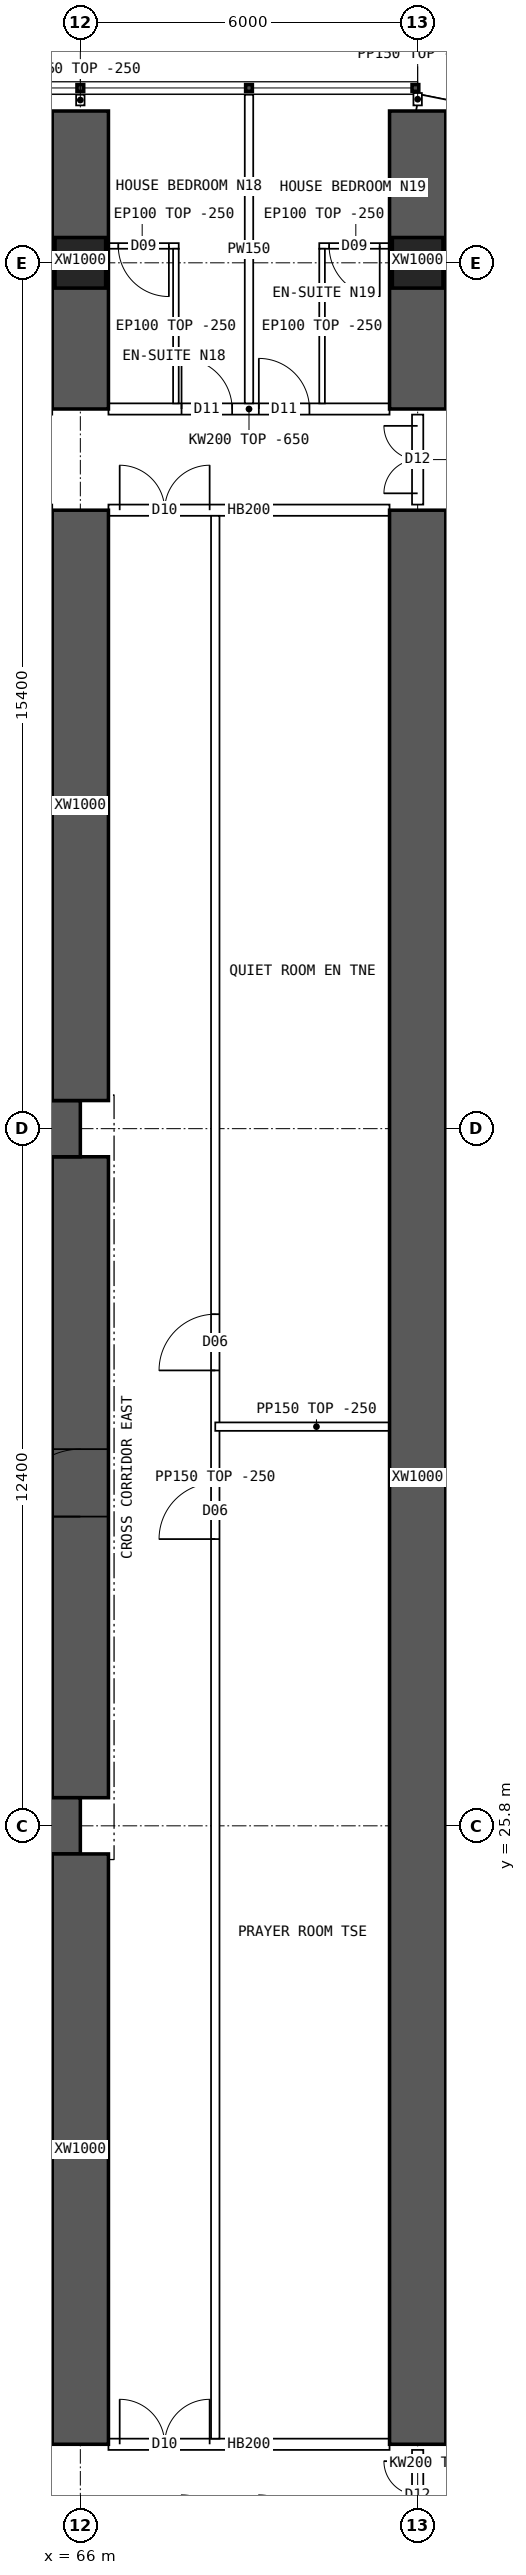
"""IFC4 building model, lengths in metres.
Left out: names, types, materials, properties, quantities, classifications, styles, units other than length and angle.
Written with IfcOpenShell. Run it as: python <this file> out.ifc"""

import sys

from ifc_helpers import new_model, si_unit, direction, frame, frame_2d, origin, origin_2d, place, context, subcontext, project, spatial, polyline, rectangle, hollow_rectangle, outline, extrude, element, fill, save


model = new_model("IFC4")
c1 = context("Model", 3, precision=1e-05, world=origin(), true_north=direction((0.0, 1.0)))
c2 = subcontext(c1, "Body", "Model", "MODEL_VIEW")
j1 = project(units=[si_unit("LENGTHUNIT", "METRE"), si_unit("PLANEANGLEUNIT", "RADIAN")], contexts=[c1])
p1 = place(None, origin())
s1 = spatial("IfcSite", under=j1, at=p1, CompositionType="ELEMENT")
p2 = place(p1, origin())
s2 = spatial("IfcBuilding", under=s1, at=p2, CompositionType="ELEMENT")
p3 = place(p2, frame((0.0, 0.0, 42.7)))
s3 = spatial("IfcBuildingStorey", under=s2, at=p3, CompositionType="ELEMENT", Elevation=42.7)
for number, where, z_axis, x_axis in (
    (1, (66.0, 53.6, 0.0), (0.0, 0.0, 1.0), (1.0, 0.0, 0.0)),
    (2, (72.0, 53.6, 0.0), (0.0, 0.0, 1.0), (1.0, 0.0, 0.0)),
):
    element("IfcColumn", number, at=place(p3, frame(where, z_axis=z_axis, x_axis=x_axis)), inside=s3, PredefinedType="COLUMN", context=c2, shape_type="SweptSolid", body=[
        extrude(hollow_rectangle(XDim=0.9, YDim=0.9, WallThickness=0.09, at=origin_2d()), origin(), (0.0, 0.0, 1.0), 3.75),
    ])
for number, where, z_axis, x_axis in (
    (3, (18.0, 25.8, 0.0), (0.0, 0.0, 1.0), (1.0, 0.0, 0.0)),
    (4, (18.0, 38.2, 0.0), (0.0, 0.0, 1.0), (1.0, 0.0, 0.0)),
):
    element("IfcWall", number, at=place(p3, frame(where, z_axis=z_axis, x_axis=x_axis)), inside=s3, PredefinedType="SHEAR", context=c2, shape_type="SweptSolid", body=[
        extrude(rectangle(XDim=48.0, YDim=1.0, at=frame_2d((24.0, 0.0))), origin(), (0.0, 0.0, 1.0), 3.75),
    ])
p4 = place(p3, frame((66.0, 26.3, 0.0), z_axis=(0.0, 0.0, 1.0), x_axis=(0.0, 1.0, 0.0)))
e5 = element("IfcWall", 5, at=p4, inside=s3, PredefinedType="SHEAR", context=c2, shape_type="SweptSolid", body=[
    extrude(rectangle(XDim=11.4, YDim=1.0, at=frame_2d((5.7, 0.0))), origin(), (0.0, 0.0, 1.0), 3.75),
])
p5 = place(p4, frame((5.0, 0.0, 0.0)))
e6 = element("IfcOpeningElement", 6, at=p5, cuts=e5, PredefinedType="OPENING", context=c2, shape_type="SweptSolid", body=[
    extrude(rectangle(XDim=1.2, YDim=2.1, at=frame_2d((0.6, 1.05))), frame((0.0, 0.51, 0.0), z_axis=(0.0, -1.0, 0.0), x_axis=(1.0, 0.0, 0.0)), (0.0, 0.0, 1.0), 1.02),
])
p6 = place(p3, frame((66.0, 51.0, 0.0), z_axis=(0.0, 0.0, 1.0), x_axis=(0.0, 1.0, 0.0)))
e7 = element("IfcWall", 7, at=p6, inside=s3, PredefinedType="SHEAR", context=c2, shape_type="SweptSolid", body=[
    extrude(rectangle(XDim=5.3, YDim=1.0, at=frame_2d((2.65, 0.0))), origin(), (0.0, 0.0, 1.0), 3.75),
])
for number, where, z_axis, x_axis in (
    (8, (66.0, 14.8, 0.0), (0.0, 0.0, 1.0), (0.0, 1.0, 0.0)),
    (9, (66.0, 38.7, 0.0), (0.0, 0.0, 1.0), (0.0, 1.0, 0.0)),
):
    element("IfcWall", number, at=place(p3, frame(where, z_axis=z_axis, x_axis=x_axis)), inside=s3, PredefinedType="SHEAR", context=c2, shape_type="SweptSolid", body=[
        extrude(rectangle(XDim=10.5, YDim=1.0, at=frame_2d((5.25, 0.0))), origin(), (0.0, 0.0, 1.0), 3.75),
    ])
p7 = place(p3, frame((72.0, 51.0, 0.0), z_axis=(0.0, 0.0, 1.0), x_axis=(0.0, 1.0, 0.0)))
e10 = element("IfcWall", 10, at=p7, inside=s3, PredefinedType="SHEAR", context=c2, shape_type="SweptSolid", body=[
    extrude(rectangle(XDim=5.3, YDim=1.0, at=frame_2d((2.65, 0.0))), origin(), (0.0, 0.0, 1.0), 3.75),
])
p8 = place(p3, frame((72.0, 14.8, 0.0), z_axis=(0.0, 0.0, 1.0), x_axis=(0.0, 1.0, 0.0)))
e11 = element("IfcWall", 11, at=p8, inside=s3, PredefinedType="SHEAR", context=c2, shape_type="SweptSolid", body=[
    extrude(rectangle(XDim=34.4, YDim=1.0, at=frame_2d((17.2, 0.0))), origin(), (0.0, 0.0, 1.0), 3.75),
])
p9 = place(p3, frame((75.157, 55.822, 0.0), z_axis=(0.0, 0.0, 1.0), x_axis=(-0.980787251524, 0.195080412259, 0.0)))
e12 = element("IfcWall", 12, at=p9, inside=s3, PredefinedType="SOLIDWALL", context=c2, shape_type="SweptSolid", body=[
    extrude(outline(polyline([(-0.03, -0.15), (3.249, -0.15), (3.189, 0.15), (0.03, 0.15), (-0.03, -0.15)])), origin(), (0.0, 0.0, 1.0), 3.5),
])
p10 = place(p9, frame((0.909, 0.0, 0.9)))
e13 = element("IfcOpeningElement", 13, at=p10, cuts=e12, PredefinedType="OPENING", context=c2, shape_type="SweptSolid", body=[
    extrude(rectangle(XDim=1.4, YDim=1.8, at=frame_2d((0.7, 0.9))), frame((0.0, 0.16, 0.0), z_axis=(0.0, -1.0, 0.0), x_axis=(1.0, 0.0, 0.0)), (0.0, 0.0, 1.0), 0.32),
])
p11 = place(p3, frame((66.5, 14.8, 0.0), z_axis=(0.0, 0.0, 1.0), x_axis=(1.0, 0.0, 0.0)))
e14 = element("IfcWall", 14, at=p11, inside=s3, PredefinedType="SOLIDWALL", context=c2, shape_type="SweptSolid", body=[
    extrude(rectangle(XDim=5.0, YDim=0.2, at=frame_2d((2.5, 0.0))), origin(), (0.0, 0.0, 1.0), 3.5),
])
p12 = place(p11, frame((0.2, 0.0, 0.0)))
e15 = element("IfcOpeningElement", 15, at=p12, cuts=e14, PredefinedType="OPENING", context=c2, shape_type="SweptSolid", body=[
    extrude(rectangle(XDim=1.6, YDim=2.1, at=frame_2d((0.8, 1.05))), frame((0.0, 0.11, 0.0), z_axis=(0.0, -1.0, 0.0), x_axis=(1.0, 0.0, 0.0)), (0.0, 0.0, 1.0), 0.22),
])
p13 = place(p3, frame((66.5, 51.0, 0.0), z_axis=(0.0, 0.0, 1.0), x_axis=(1.0, 0.0, 0.0)))
e16 = element("IfcWall", 16, at=p13, inside=s3, PredefinedType="SOLIDWALL", context=c2, shape_type="SweptSolid", body=[
    extrude(outline(polyline([(0.0, 0.0), (5.0, 0.0), (5.0, 3.1), (0.0, 3.1), (0.0, 0.0)])), frame((0.0, 0.1, 0.0), z_axis=(0.0, -1.0, 0.0), x_axis=(1.0, 0.0, 0.0)), (0.0, 0.0, 1.0), 0.2),
])
p14 = place(p13, frame((1.3, 0.0, 0.0)))
e17 = element("IfcOpeningElement", 17, at=p14, cuts=e16, PredefinedType="OPENING", context=c2, shape_type="SweptSolid", body=[
    extrude(rectangle(XDim=0.9, YDim=2.1, at=frame_2d((0.45, 1.05))), frame((0.0, 0.11, 0.0), z_axis=(0.0, -1.0, 0.0), x_axis=(1.0, 0.0, 0.0)), (0.0, 0.0, 1.0), 0.22),
])
p15 = place(p13, frame((2.675, 0.0, 0.0)))
e18 = element("IfcOpeningElement", 18, at=p15, cuts=e16, PredefinedType="OPENING", context=c2, shape_type="SweptSolid", body=[
    extrude(rectangle(XDim=0.9, YDim=2.1, at=frame_2d((0.45, 1.05))), frame((0.0, 0.11, 0.0), z_axis=(0.0, -1.0, 0.0), x_axis=(1.0, 0.0, 0.0)), (0.0, 0.0, 1.0), 0.22),
])
p16 = place(p3, frame((66.5, 49.2, 0.0), z_axis=(0.0, 0.0, 1.0), x_axis=(1.0, 0.0, 0.0)))
e19 = element("IfcWall", 19, at=p16, inside=s3, PredefinedType="SOLIDWALL", context=c2, shape_type="SweptSolid", body=[
    extrude(rectangle(XDim=5.0, YDim=0.2, at=frame_2d((2.5, 0.0))), origin(), (0.0, 0.0, 1.0), 3.5),
])
p17 = place(p16, frame((0.2, 0.0, 0.0)))
e20 = element("IfcOpeningElement", 20, at=p17, cuts=e19, PredefinedType="OPENING", context=c2, shape_type="SweptSolid", body=[
    extrude(rectangle(XDim=1.6, YDim=2.1, at=frame_2d((0.8, 1.05))), frame((0.0, 0.11, 0.0), z_axis=(0.0, -1.0, 0.0), x_axis=(1.0, 0.0, 0.0)), (0.0, 0.0, 1.0), 0.22),
])
p18 = place(p3, frame((69.0, 56.59, 0.0), z_axis=(0.0, 0.0, 1.0), x_axis=(0.0, -1.0, 0.0)))
e21 = element("IfcWall", 21, at=p18, inside=s3, PredefinedType="PARTITIONING", context=c2, shape_type="SweptSolid", body=[
    extrude(outline(polyline([(0.0, 0.0), (5.49, 0.0), (5.49, 3.1), (5.442, 3.1), (5.44, 3.5), (3.192, 3.5), (3.19, 3.1), (2.792, 3.1), (2.79, 3.5), (0.0, 3.5), (0.0, 0.0)])), frame((0.0, 0.075, 0.0), z_axis=(0.0, -1.0, 0.0), x_axis=(1.0, 0.0, 0.0)), (0.0, 0.0, 1.0), 0.15),
])
p19 = place(p3, frame((66.45, 53.9, 0.0), z_axis=(0.0, 0.0, 1.0), x_axis=(1.0, 0.0, 0.0)))
e22 = element("IfcWall", 22, at=p19, inside=s3, PredefinedType="PARTITIONING", context=c2, shape_type="SweptSolid", body=[
    extrude(rectangle(XDim=1.3, YDim=0.1, at=frame_2d((0.65, 0.0))), origin(), (0.0, 0.0, 1.0), 3.5),
])
p20 = place(p19, frame((0.225, 0.0, 0.0)))
e23 = element("IfcOpeningElement", 23, at=p20, cuts=e22, PredefinedType="OPENING", context=c2, shape_type="SweptSolid", body=[
    extrude(rectangle(XDim=0.9, YDim=2.1, at=frame_2d((0.45, 1.05))), frame((0.0, 0.06, 0.0), z_axis=(0.0, -1.0, 0.0), x_axis=(1.0, 0.0, 0.0)), (0.0, 0.0, 1.0), 0.12),
])
p21 = place(p3, frame((67.7, 53.85, 0.0), z_axis=(0.0, 0.0, 1.0), x_axis=(0.0, -1.0, 0.0)))
e24 = element("IfcWall", 24, at=p21, inside=s3, PredefinedType="PARTITIONING", context=c2, shape_type="SweptSolid", body=[
    extrude(outline(polyline([(0.0, 0.0), (2.75, 0.0), (2.75, 3.1), (2.702, 3.1), (2.7, 3.5), (0.452, 3.5), (0.45, 3.1), (0.0, 3.1), (0.0, 0.0)])), frame((0.0, 0.05, 0.0), z_axis=(0.0, -1.0, 0.0), x_axis=(1.0, 0.0, 0.0)), (0.0, 0.0, 1.0), 0.1),
])
p22 = place(p3, frame((70.25, 53.9, 0.0), z_axis=(0.0, 0.0, 1.0), x_axis=(1.0, 0.0, 0.0)))
e25 = element("IfcWall", 25, at=p22, inside=s3, PredefinedType="PARTITIONING", context=c2, shape_type="SweptSolid", body=[
    extrude(rectangle(XDim=1.3, YDim=0.1, at=frame_2d((0.65, 0.0))), origin(), (0.0, 0.0, 1.0), 3.5),
])
p23 = place(p22, frame((0.175, 0.0, 0.0)))
e26 = element("IfcOpeningElement", 26, at=p23, cuts=e25, PredefinedType="OPENING", context=c2, shape_type="SweptSolid", body=[
    extrude(rectangle(XDim=0.9, YDim=2.1, at=frame_2d((0.45, 1.05))), frame((0.0, 0.06, 0.0), z_axis=(0.0, -1.0, 0.0), x_axis=(1.0, 0.0, 0.0)), (0.0, 0.0, 1.0), 0.12),
])
p24 = place(p3, frame((70.3, 53.85, 0.0), z_axis=(0.0, 0.0, 1.0), x_axis=(0.0, -1.0, 0.0)))
e27 = element("IfcWall", 27, at=p24, inside=s3, PredefinedType="PARTITIONING", context=c2, shape_type="SweptSolid", body=[
    extrude(outline(polyline([(0.0, 0.0), (2.75, 0.0), (2.75, 3.1), (2.702, 3.1), (2.7, 3.5), (0.452, 3.5), (0.45, 3.1), (0.0, 3.1), (0.0, 0.0)])), frame((0.0, 0.05, 0.0), z_axis=(0.0, -1.0, 0.0), x_axis=(1.0, 0.0, 0.0)), (0.0, 0.0, 1.0), 0.1),
])
p25 = place(p3, frame((68.4, 14.9, 0.0), z_axis=(0.0, 0.0, 1.0), x_axis=(0.0, 1.0, 0.0)))
e28 = element("IfcWall", 28, at=p25, inside=s3, PredefinedType="PARTITIONING", context=c2, shape_type="SweptSolid", body=[
    extrude(rectangle(XDim=34.2, YDim=0.15, at=frame_2d((17.1, 0.0))), origin(), (0.0, 0.0, 1.0), 3.5),
])
p26 = place(p25, frame((16.0, 0.0, 0.0)))
e29 = element("IfcOpeningElement", 29, at=p26, cuts=e28, PredefinedType="OPENING", context=c2, shape_type="SweptSolid", body=[
    extrude(rectangle(XDim=1.0, YDim=2.1, at=frame_2d((0.5, 1.05))), frame((0.0, 0.085, 0.0), z_axis=(0.0, -1.0, 0.0), x_axis=(1.0, 0.0, 0.0)), (0.0, 0.0, 1.0), 0.17),
])
p27 = place(p25, frame((19.0, 0.0, 0.0)))
e30 = element("IfcOpeningElement", 30, at=p27, cuts=e28, PredefinedType="OPENING", context=c2, shape_type="SweptSolid", body=[
    extrude(rectangle(XDim=1.0, YDim=2.1, at=frame_2d((0.5, 1.05))), frame((0.0, 0.085, 0.0), z_axis=(0.0, -1.0, 0.0), x_axis=(1.0, 0.0, 0.0)), (0.0, 0.0, 1.0), 0.17),
])
p28 = place(p3, frame((68.4, 32.9, 0.0), z_axis=(0.0, 0.0, 1.0), x_axis=(1.0, 0.0, 0.0)))
e31 = element("IfcWall", 31, at=p28, inside=s3, PredefinedType="PARTITIONING", context=c2, shape_type="SweptSolid", body=[
    extrude(rectangle(XDim=3.6, YDim=0.15, at=frame_2d((1.8, 0.0))), origin(), (0.0, 0.0, 1.0), 3.5),
])
p29 = place(p3, frame((72.075, 30.85, 0.0), z_axis=(0.0, 0.0, 1.0), x_axis=(1.0, 0.0, 0.0)))
e32 = element("IfcWall", 32, at=p29, inside=s3, PredefinedType="PARTITIONING", context=c2, shape_type="SweptSolid", body=[
    extrude(outline(polyline([(0.0, 0.0), (8.02, 0.0), (8.02, 3.5), (6.227, 3.5), (6.225, 3.05), (5.627, 3.05), (5.625, 3.5), (0.0, 3.5), (0.0, 0.0)])), frame((0.0, 0.075, 0.0), z_axis=(0.0, -1.0, 0.0), x_axis=(1.0, 0.0, 0.0)), (0.0, 0.0, 1.0), 0.15),
])
p30 = place(p3, frame((72.0, 13.1, 0.0), z_axis=(0.0, 0.0, 1.0), x_axis=(0.0, 1.0, 0.0)))
e33 = element("IfcWall", 33, at=p30, inside=s3, PredefinedType="SOLIDWALL", context=c2, shape_type="SweptSolid", body=[
    extrude(outline(polyline([(0.0, 0.0), (1.6, 0.0), (1.6, 3.05), (0.0, 3.05), (0.0, 0.0)])), frame((0.0, 0.1, 0.0), z_axis=(0.0, -1.0, 0.0), x_axis=(1.0, 0.0, 0.0)), (0.0, 0.0, 1.0), 0.2),
])
p31 = place(p30, frame((0.2, 0.0, 0.0)))
e34 = element("IfcOpeningElement", 34, at=p31, cuts=e33, PredefinedType="OPENING", context=c2, shape_type="SweptSolid", body=[
    extrude(rectangle(XDim=1.2, YDim=2.1, at=frame_2d((0.6, 1.05))), frame((0.0, 0.11, 0.0), z_axis=(0.0, -1.0, 0.0), x_axis=(1.0, 0.0, 0.0)), (0.0, 0.0, 1.0), 0.22),
])
p32 = place(p3, frame((72.0, 49.3, 0.0), z_axis=(0.0, 0.0, 1.0), x_axis=(0.0, 1.0, 0.0)))
e35 = element("IfcWall", 35, at=p32, inside=s3, PredefinedType="SOLIDWALL", context=c2, shape_type="SweptSolid", body=[
    extrude(outline(polyline([(0.0, 0.0), (1.6, 0.0), (1.6, 3.05), (0.0, 3.05), (0.0, 0.0)])), frame((0.0, 0.1, 0.0), z_axis=(0.0, -1.0, 0.0), x_axis=(1.0, 0.0, 0.0)), (0.0, 0.0, 1.0), 0.2),
])
p33 = place(p32, frame((0.2, 0.0, 0.0)))
e36 = element("IfcOpeningElement", 36, at=p33, cuts=e35, PredefinedType="OPENING", context=c2, shape_type="SweptSolid", body=[
    extrude(rectangle(XDim=1.2, YDim=2.1, at=frame_2d((0.6, 1.05))), frame((0.0, 0.11, 0.0), z_axis=(0.0, -1.0, 0.0), x_axis=(1.0, 0.0, 0.0)), (0.0, 0.0, 1.0), 0.22),
])
p34 = place(p3, frame((66.0, 56.4, 0.0), z_axis=(0.0, 0.0, 1.0), x_axis=(0.0, 1.0, 0.0)))
e37 = element("IfcWall", 37, at=p34, inside=s3, PredefinedType="PARTITIONING", context=c2, shape_type="SweptSolid", body=[
    extrude(rectangle(XDim=0.19, YDim=0.15, at=frame_2d((0.095, 0.0))), origin(), (0.0, 0.0, 1.0), 3.5),
])
p35 = place(p3, frame((72.0, 56.4, 0.0), z_axis=(0.0, 0.0, 1.0), x_axis=(0.0, 1.0, 0.0)))
e38 = element("IfcWall", 38, at=p35, inside=s3, PredefinedType="PARTITIONING", context=c2, shape_type="SweptSolid", body=[
    extrude(rectangle(XDim=0.22, YDim=0.15, at=frame_2d((0.11, 0.0))), origin(), (0.0, 0.0, 1.0), 3.5),
])
p36 = place(p5, origin())
e39 = element("IfcDoor", 39, at=p36, inside=s3, OperationType="SINGLE_SWING_LEFT", PredefinedType="DOOR", context=c2, shape_type="SweptSolid", body=[
    extrude(rectangle(XDim=1.2, YDim=2.1, at=frame_2d((0.6, 1.05))), frame((0.0, 0.025, 0.0), z_axis=(0.0, -1.0, 0.0), x_axis=(1.0, 0.0, 0.0)), (0.0, 0.0, 1.0), 0.05),
])
fill(e6, e39)
p37 = place(p12, origin())
e40 = element("IfcDoor", 40, at=p37, inside=s3, OperationType="DOUBLE_DOOR_SINGLE_SWING", PredefinedType="DOOR", context=c2, shape_type="SweptSolid", body=[
    extrude(rectangle(XDim=1.6, YDim=2.1, at=frame_2d((0.8, 1.05))), frame((0.0, 0.025, 0.0), z_axis=(0.0, -1.0, 0.0), x_axis=(1.0, 0.0, 0.0)), (0.0, 0.0, 1.0), 0.05),
])
fill(e15, e40)
p38 = place(p17, origin())
e41 = element("IfcDoor", 41, at=p38, inside=s3, OperationType="DOUBLE_DOOR_SINGLE_SWING", PredefinedType="DOOR", context=c2, shape_type="SweptSolid", body=[
    extrude(rectangle(XDim=1.6, YDim=2.1, at=frame_2d((0.8, 1.05))), frame((0.0, 0.025, 0.0), z_axis=(0.0, -1.0, 0.0), x_axis=(1.0, 0.0, 0.0)), (0.0, 0.0, 1.0), 0.05),
])
fill(e20, e41)
p39 = place(p20, origin())
e42 = element("IfcDoor", 42, at=p39, inside=s3, OperationType="SINGLE_SWING_RIGHT", PredefinedType="DOOR", context=c2, shape_type="SweptSolid", body=[
    extrude(rectangle(XDim=0.9, YDim=2.1, at=frame_2d((0.45, 1.05))), frame((0.0, 0.025, 0.0), z_axis=(0.0, -1.0, 0.0), x_axis=(1.0, 0.0, 0.0)), (0.0, 0.0, 1.0), 0.05),
])
fill(e23, e42)
p40 = place(p14, origin())
e43 = element("IfcDoor", 43, at=p40, inside=s3, OperationType="SINGLE_SWING_LEFT", PredefinedType="DOOR", context=c2, shape_type="SweptSolid", body=[
    extrude(rectangle(XDim=0.9, YDim=2.1, at=frame_2d((0.45, 1.05))), frame((0.0, 0.025, 0.0), z_axis=(0.0, -1.0, 0.0), x_axis=(1.0, 0.0, 0.0)), (0.0, 0.0, 1.0), 0.05),
])
fill(e17, e43)
p41 = place(p23, origin())
e44 = element("IfcDoor", 44, at=p41, inside=s3, OperationType="SINGLE_SWING_RIGHT", PredefinedType="DOOR", context=c2, shape_type="SweptSolid", body=[
    extrude(rectangle(XDim=0.9, YDim=2.1, at=frame_2d((0.45, 1.05))), frame((0.0, 0.025, 0.0), z_axis=(0.0, -1.0, 0.0), x_axis=(1.0, 0.0, 0.0)), (0.0, 0.0, 1.0), 0.05),
])
fill(e26, e44)
p42 = place(p15, origin())
e45 = element("IfcDoor", 45, at=p42, inside=s3, OperationType="SINGLE_SWING_LEFT", PredefinedType="DOOR", context=c2, shape_type="SweptSolid", body=[
    extrude(rectangle(XDim=0.9, YDim=2.1, at=frame_2d((0.45, 1.05))), frame((0.0, 0.025, 0.0), z_axis=(0.0, -1.0, 0.0), x_axis=(1.0, 0.0, 0.0)), (0.0, 0.0, 1.0), 0.05),
])
fill(e18, e45)
p43 = place(p26, origin())
e46 = element("IfcDoor", 46, at=p43, inside=s3, OperationType="SINGLE_SWING_LEFT", PredefinedType="DOOR", context=c2, shape_type="SweptSolid", body=[
    extrude(rectangle(XDim=1.0, YDim=2.1, at=frame_2d((0.5, 1.05))), frame((0.0, 0.025, 0.0), z_axis=(0.0, -1.0, 0.0), x_axis=(1.0, 0.0, 0.0)), (0.0, 0.0, 1.0), 0.05),
])
fill(e29, e46)
p44 = place(p27, origin())
e47 = element("IfcDoor", 47, at=p44, inside=s3, OperationType="SINGLE_SWING_LEFT", PredefinedType="DOOR", context=c2, shape_type="SweptSolid", body=[
    extrude(rectangle(XDim=1.0, YDim=2.1, at=frame_2d((0.5, 1.05))), frame((0.0, 0.025, 0.0), z_axis=(0.0, -1.0, 0.0), x_axis=(1.0, 0.0, 0.0)), (0.0, 0.0, 1.0), 0.05),
])
fill(e30, e47)
p45 = place(p31, origin())
e48 = element("IfcDoor", 48, at=p45, inside=s3, OperationType="DOUBLE_DOOR_SINGLE_SWING", PredefinedType="DOOR", context=c2, shape_type="SweptSolid", body=[
    extrude(rectangle(XDim=1.2, YDim=2.1, at=frame_2d((0.6, 1.05))), frame((0.0, 0.025, 0.0), z_axis=(0.0, -1.0, 0.0), x_axis=(1.0, 0.0, 0.0)), (0.0, 0.0, 1.0), 0.05),
])
fill(e34, e48)
p46 = place(p33, origin())
e49 = element("IfcDoor", 49, at=p46, inside=s3, OperationType="DOUBLE_DOOR_SINGLE_SWING", PredefinedType="DOOR", context=c2, shape_type="SweptSolid", body=[
    extrude(rectangle(XDim=1.2, YDim=2.1, at=frame_2d((0.6, 1.05))), frame((0.0, 0.025, 0.0), z_axis=(0.0, -1.0, 0.0), x_axis=(1.0, 0.0, 0.0)), (0.0, 0.0, 1.0), 0.05),
])
fill(e36, e49)
save(model, sys.argv[1])
